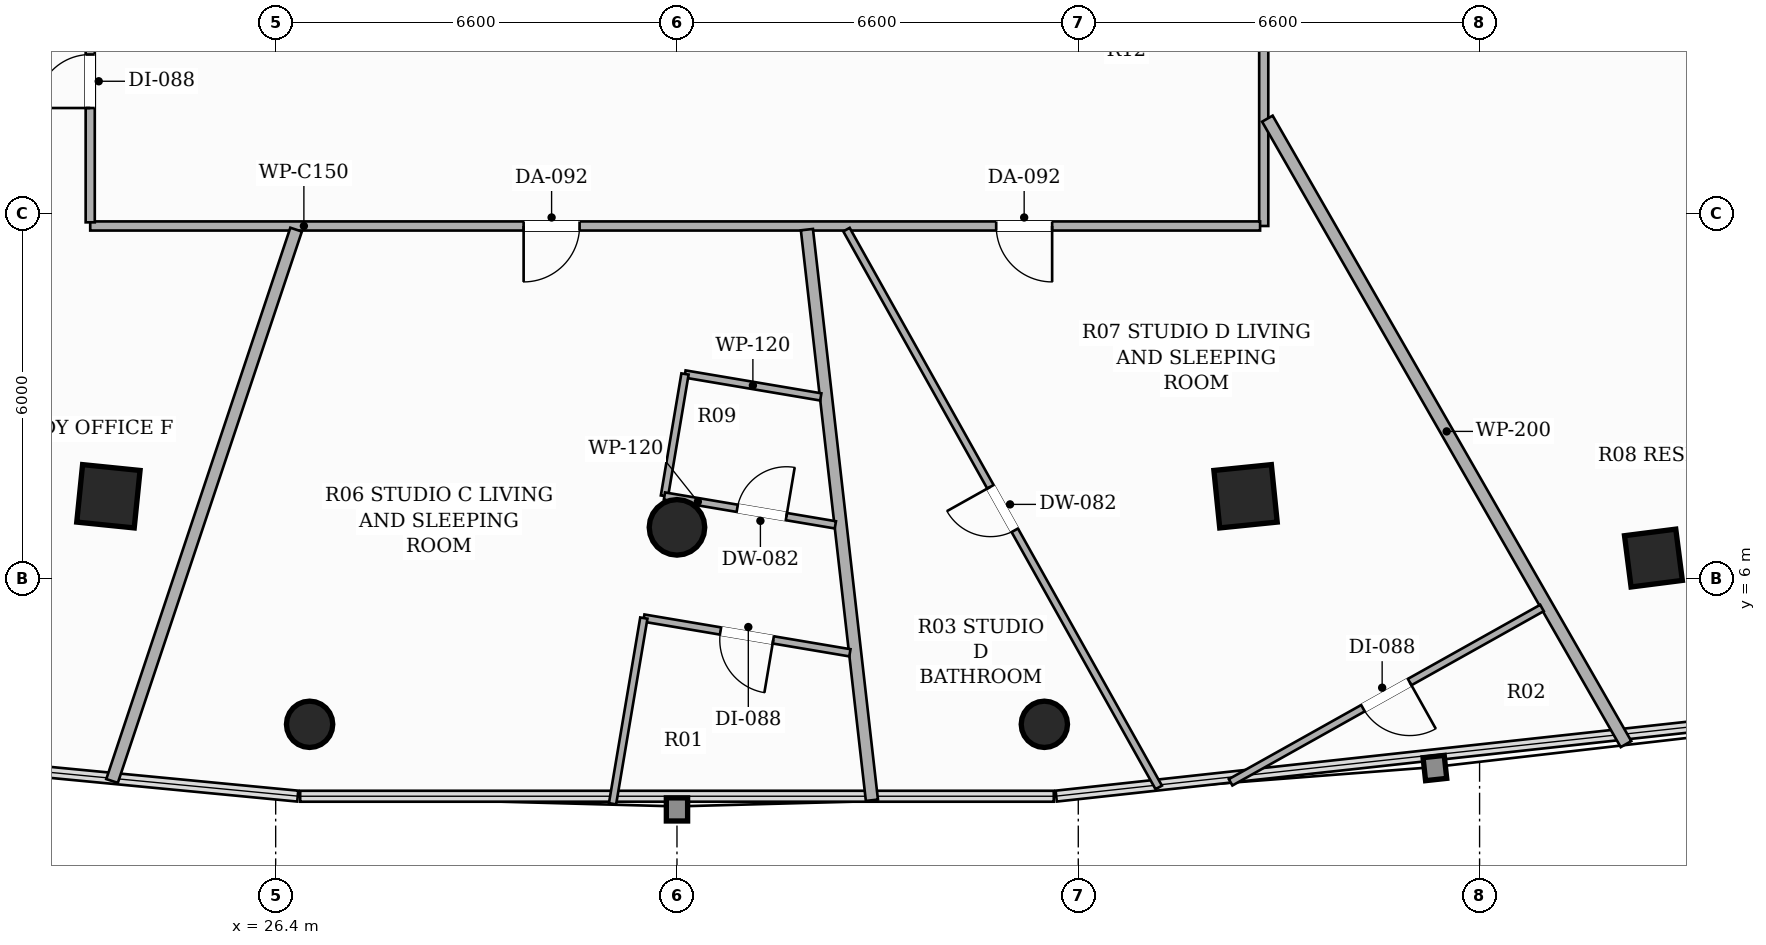
"""IFC4 building model, lengths in metres.
Left out: names, types, materials, properties, quantities, classifications, styles, units other than length and angle.
Written with IfcOpenShell. Run it as: python <this file> out.ifc"""

import sys

from ifc_helpers import new_model, si_unit, direction, frame, frame_2d, origin, origin_2d, place, context, subcontext, project, spatial, rectangle, hollow_rectangle, hollow_circle, extrude, element, fill, save


model = new_model("IFC4")
c1 = context("Model", 3, precision=1e-05, world=origin(), true_north=direction((0.0, 1.0)))
c2 = subcontext(c1, "Body", "Model", "MODEL_VIEW")
j1 = project(units=[si_unit("LENGTHUNIT", "METRE"), si_unit("PLANEANGLEUNIT", "RADIAN")], contexts=[c1])
p1 = place(None, origin())
s1 = spatial("IfcSite", under=j1, at=p1, CompositionType="ELEMENT")
p2 = place(p1, origin())
s2 = spatial("IfcBuilding", under=s1, at=p2, CompositionType="ELEMENT")
p3 = place(p2, frame((0.0, 0.0, 93.95)))
s3 = spatial("IfcBuildingStorey", under=s2, at=p3, CompositionType="ELEMENT", Elevation=93.95)
p4 = place(p3, frame((23.649, 7.355, 0.0), z_axis=(0.0, 0.0, 1.0), x_axis=(-0.994880708829, 0.101056297183, 0.0)))
e1 = element("IfcColumn", 1, at=p4, inside=s3, PredefinedType="COLUMN", context=c2, shape_type="SweptSolid", body=[
    extrude(hollow_rectangle(XDim=0.95, YDim=0.95, WallThickness=0.032, at=origin_2d()), origin(), (0.0, 0.0, 1.0), 3.3),
])
p5 = place(p3, frame((33.0, 6.844, 0.0), z_axis=(0.0, 0.0, 1.0), x_axis=(1.0, 0.0, 0.0)))
e2 = element("IfcColumn", 2, at=p5, inside=s3, PredefinedType="COLUMN", context=c2, shape_type="SweptSolid", body=[
    extrude(hollow_circle(Radius=0.457, WallThickness=0.025, at=origin_2d()), origin(), (0.0, 0.0, 1.0), 3.3),
])
p6 = place(p3, frame((42.351, 7.355, 0.0), z_axis=(0.0, 0.0, 1.0), x_axis=(0.994880708829, 0.101056297183, 0.0)))
e3 = element("IfcColumn", 3, at=p6, inside=s3, PredefinedType="COLUMN", context=c2, shape_type="SweptSolid", body=[
    extrude(hollow_rectangle(XDim=0.95, YDim=0.95, WallThickness=0.032, at=origin_2d()), origin(), (0.0, 0.0, 1.0), 3.3),
])
p7 = place(p3, frame((49.059, 6.339, 0.0), z_axis=(0.0, 0.0, 1.0), x_axis=(0.99189444259, 0.127064608601, 0.0)))
e4 = element("IfcColumn", 4, at=p7, inside=s3, PredefinedType="COLUMN", context=c2, shape_type="SweptSolid", body=[
    extrude(hollow_rectangle(XDim=0.85, YDim=0.85, WallThickness=0.028, at=origin_2d()), origin(), (0.0, 0.0, 1.0), 3.3),
])
for number, where, z_axis, x_axis in (
    (5, (26.958, 3.605, 0.0), (0.0, 0.0, 1.0), (1.0, 0.0, 0.0)),
    (6, (39.042, 3.605, 0.0), (0.0, 0.0, 1.0), (1.0, 0.0, 0.0)),
):
    element("IfcColumn", number, at=place(p3, frame(where, z_axis=z_axis, x_axis=x_axis)), inside=s3, PredefinedType="COLUMN", context=c2, shape_type="SweptSolid", body=[
        extrude(hollow_circle(Radius=0.381, WallThickness=0.022, at=origin_2d()), origin(), (0.0, 0.0, 1.0), 3.3),
    ])
p8 = place(p3, frame((42.65, 36.84, 0.0), z_axis=(0.0, 0.0, 1.0), x_axis=(0.0, -1.0, 0.0)))
e7 = element("IfcWall", 7, at=p8, inside=s3, PredefinedType="PARTITIONING", context=c2, shape_type="SweptSolid", body=[
    extrude(rectangle(XDim=25.04, YDim=0.15, at=frame_2d((12.52, 0.0))), origin(), (0.0, 0.0, 1.0), 2.373),
])
p9 = place(p8, frame((6.114, 0.0, 0.0)))
e8 = element("IfcOpeningElement", 8, at=p9, cuts=e7, PredefinedType="OPENING", context=c2, shape_type="SweptSolid", body=[
    extrude(rectangle(XDim=0.88, YDim=2.1, at=frame_2d((0.44, 1.05))), frame((0.0, 0.085, 0.0), z_axis=(0.0, -1.0, 0.0), x_axis=(1.0, 0.0, 0.0)), (0.0, 0.0, 1.0), 0.17),
])
p10 = place(p8, frame((18.864, 0.0, 0.0)))
e9 = element("IfcOpeningElement", 9, at=p10, cuts=e7, PredefinedType="OPENING", context=c2, shape_type="SweptSolid", body=[
    extrude(rectangle(XDim=0.88, YDim=2.1, at=frame_2d((0.44, 1.05))), frame((0.0, 0.085, 0.0), z_axis=(0.0, -1.0, 0.0), x_axis=(1.0, 0.0, 0.0)), (0.0, 0.0, 1.0), 0.17),
])
p11 = place(p8, frame((13.765, 0.0, 0.0)))
e10 = element("IfcOpeningElement", 10, at=p11, cuts=e7, PredefinedType="OPENING", context=c2, shape_type="SweptSolid", body=[
    extrude(rectangle(XDim=0.92, YDim=2.15, at=frame_2d((0.46, 1.075))), frame((0.0, 0.085, 0.0), z_axis=(0.0, -1.0, 0.0), x_axis=(1.0, 0.0, 0.0)), (0.0, 0.0, 1.0), 0.17),
])
p12 = place(p3, frame((42.59, 11.8, 0.0), z_axis=(0.0, 0.0, 1.0), x_axis=(-1.0, 0.0, 0.0)))
e11 = element("IfcWall", 11, at=p12, inside=s3, PredefinedType="PARTITIONING", context=c2, shape_type="SweptSolid", body=[
    extrude(rectangle(XDim=19.24, YDim=0.15, at=frame_2d((9.62, 0.0))), origin(), (0.0, 0.0, 1.0), 2.629),
])
p13 = place(p12, frame((11.192, 0.0, 0.0)))
e12 = element("IfcOpeningElement", 12, at=p13, cuts=e11, PredefinedType="OPENING", context=c2, shape_type="SweptSolid", body=[
    extrude(rectangle(XDim=0.92, YDim=2.15, at=frame_2d((0.46, 1.075))), frame((0.0, 0.085, 0.0), z_axis=(0.0, -1.0, 0.0), x_axis=(1.0, 0.0, 0.0)), (0.0, 0.0, 1.0), 0.17),
])
p14 = place(p12, frame((3.42, 0.0, 0.0)))
e13 = element("IfcOpeningElement", 13, at=p14, cuts=e11, PredefinedType="OPENING", context=c2, shape_type="SweptSolid", body=[
    extrude(rectangle(XDim=0.92, YDim=2.15, at=frame_2d((0.46, 1.075))), frame((0.0, 0.085, 0.0), z_axis=(0.0, -1.0, 0.0), x_axis=(1.0, 0.0, 0.0)), (0.0, 0.0, 1.0), 0.17),
])
p15 = place(p3, frame((23.35, 11.86, 0.0), z_axis=(0.0, 0.0, 1.0), x_axis=(0.0, 1.0, 0.0)))
e14 = element("IfcWall", 14, at=p15, inside=s3, PredefinedType="PARTITIONING", context=c2, shape_type="SweptSolid", body=[
    extrude(rectangle(XDim=25.04, YDim=0.15, at=frame_2d((12.52, 0.0))), origin(), (0.0, 0.0, 1.0), 2.373),
])
p16 = place(p15, frame((18.285, 0.0, 0.0)))
e15 = element("IfcOpeningElement", 15, at=p16, cuts=e14, PredefinedType="OPENING", context=c2, shape_type="SweptSolid", body=[
    extrude(rectangle(XDim=0.88, YDim=2.1, at=frame_2d((0.44, 1.05))), frame((0.0, 0.085, 0.0), z_axis=(0.0, -1.0, 0.0), x_axis=(1.0, 0.0, 0.0)), (0.0, 0.0, 1.0), 0.17),
])
p17 = place(p15, frame((10.545, 0.0, 0.0)))
e16 = element("IfcOpeningElement", 16, at=p17, cuts=e14, PredefinedType="OPENING", context=c2, shape_type="SweptSolid", body=[
    extrude(rectangle(XDim=0.88, YDim=2.1, at=frame_2d((0.44, 1.05))), frame((0.0, 0.085, 0.0), z_axis=(0.0, -1.0, 0.0), x_axis=(1.0, 0.0, 0.0)), (0.0, 0.0, 1.0), 0.17),
])
p18 = place(p15, frame((6.496, 0.0, 0.0)))
e17 = element("IfcOpeningElement", 17, at=p18, cuts=e14, PredefinedType="OPENING", context=c2, shape_type="SweptSolid", body=[
    extrude(rectangle(XDim=0.88, YDim=2.1, at=frame_2d((0.44, 1.05))), frame((0.0, 0.085, 0.0), z_axis=(0.0, -1.0, 0.0), x_axis=(1.0, 0.0, 0.0)), (0.0, 0.0, 1.0), 0.17),
])
p19 = place(p15, frame((1.88, 0.0, 0.0)))
e18 = element("IfcOpeningElement", 18, at=p19, cuts=e14, PredefinedType="OPENING", context=c2, shape_type="SweptSolid", body=[
    extrude(rectangle(XDim=0.88, YDim=2.1, at=frame_2d((0.44, 1.05))), frame((0.0, 0.085, 0.0), z_axis=(0.0, -1.0, 0.0), x_axis=(1.0, 0.0, 0.0)), (0.0, 0.0, 1.0), 0.17),
])
p20 = place(p3, frame((57.393, 14.263, 0.0), z_axis=(0.0, 0.0, 1.0), x_axis=(-0.83243126042, 0.554128321488, 0.0)))
e19 = element("IfcWall", 19, at=p20, inside=s3, PredefinedType="PARTITIONING", context=c2, shape_type="SweptSolid", body=[
    extrude(rectangle(XDim=17.639, YDim=0.2, at=frame_2d((8.819, 0.0))), origin(), (0.0, 0.0, 1.0), 2.373),
])
p21 = place(p3, frame((48.608, 3.279, 0.0), z_axis=(0.0, 0.0, 1.0), x_axis=(-0.497428948928, 0.867504720891, 0.0)))
e20 = element("IfcWall", 20, at=p21, inside=s3, PredefinedType="PARTITIONING", context=c2, shape_type="SweptSolid", body=[
    extrude(rectangle(XDim=11.857, YDim=0.2, at=frame_2d((5.928, 0.0))), origin(), (0.0, 0.0, 1.0), 2.373),
])
p22 = place(p3, frame((42.71, 21.57, 0.0), z_axis=(0.0, 0.0, 1.0), x_axis=(0.736048495707, -0.67692880864, 0.0)))
e21 = element("IfcWall", 21, at=p22, inside=s3, PredefinedType="PARTITIONING", context=c2, shape_type="SweptSolid", body=[
    extrude(rectangle(XDim=23.274, YDim=0.2, at=frame_2d((11.637, 0.0))), origin(), (0.0, 0.0, 1.0), 2.373),
])
p23 = place(p3, frame((23.29, 21.11, 0.0), z_axis=(0.0, 0.0, 1.0), x_axis=(-0.718846392138, -0.695168946739, 0.0)))
e22 = element("IfcWall", 22, at=p23, inside=s3, PredefinedType="PARTITIONING", context=c2, shape_type="SweptSolid", body=[
    extrude(rectangle(XDim=22.973, YDim=0.2, at=frame_2d((11.487, 0.0))), origin(), (0.0, 0.0, 1.0), 2.373),
])
p24 = place(p3, frame((35.137, 11.74, 0.0), z_axis=(0.0, 0.0, 1.0), x_axis=(0.113194461651, -0.993572852815, 0.0)))
e23 = element("IfcWall", 23, at=p24, inside=s3, PredefinedType="PARTITIONING", context=c2, shape_type="SweptSolid", body=[
    extrude(rectangle(XDim=9.445, YDim=0.2, at=frame_2d((4.722, 0.0))), origin(), (0.0, 0.0, 1.0), 2.373),
])
p25 = place(p3, frame((23.709, 2.673, 0.0), z_axis=(0.0, 0.0, 1.0), x_axis=(0.316679801448, 0.948532499894, 0.0)))
e24 = element("IfcWall", 24, at=p25, inside=s3, PredefinedType="PARTITIONING", context=c2, shape_type="SweptSolid", body=[
    extrude(rectangle(XDim=9.559, YDim=0.2, at=frame_2d((4.779, 0.0))), origin(), (0.0, 0.0, 1.0), 2.373),
])
p26 = place(p3, frame((23.29, 16.503, 0.0), z_axis=(0.0, 0.0, 1.0), x_axis=(-0.57002789499, -0.821625339759, 0.0)))
e25 = element("IfcWall", 25, at=p26, inside=s3, PredefinedType="PARTITIONING", context=c2, shape_type="SweptSolid", body=[
    extrude(rectangle(XDim=15.671, YDim=0.2, at=frame_2d((7.836, 0.0))), origin(), (0.0, 0.0, 1.0), 2.373),
])
p27 = place(p3, frame((35.365, 8.989, 0.0), z_axis=(0.0, 0.0, 1.0), x_axis=(-0.986047933852, 0.166461623646, 0.0)))
e26 = element("IfcWall", 26, at=p27, inside=s3, PredefinedType="PARTITIONING", context=c2, shape_type="SweptSolid", body=[
    extrude(rectangle(XDim=2.264, YDim=0.12, at=frame_2d((1.132, 0.0))), origin(), (0.0, 0.0, 1.0), 2.629),
])
p28 = place(p3, frame((33.132, 9.366, 0.0), z_axis=(0.0, 0.0, 1.0), x_axis=(-0.166129895483, -0.986103877807, 0.0)))
e27 = element("IfcWall", 27, at=p28, inside=s3, PredefinedType="PARTITIONING", context=c2, shape_type="SweptSolid", body=[
    extrude(rectangle(XDim=2.035, YDim=0.12, at=frame_2d((1.018, 0.0))), origin(), (0.0, 0.0, 1.0), 2.629),
])
p29 = place(p3, frame((32.794, 7.359, 0.0), z_axis=(0.0, 0.0, 1.0), x_axis=(0.986086685245, -0.166231913849, 0.0)))
e28 = element("IfcWall", 28, at=p29, inside=s3, PredefinedType="PARTITIONING", context=c2, shape_type="SweptSolid", body=[
    extrude(rectangle(XDim=2.851, YDim=0.12, at=frame_2d((1.425, 0.0))), origin(), (0.0, 0.0, 1.0), 2.629),
])
p30 = place(p29, frame((1.214, 0.0, 0.0)))
e29 = element("IfcOpeningElement", 29, at=p30, cuts=e28, PredefinedType="OPENING", context=c2, shape_type="SweptSolid", body=[
    extrude(rectangle(XDim=0.82, YDim=2.1, at=frame_2d((0.41, 1.05))), frame((0.0, 0.07, 0.0), z_axis=(0.0, -1.0, 0.0), x_axis=(1.0, 0.0, 0.0)), (0.0, 0.0, 1.0), 0.14),
])
p31 = place(p3, frame((35.844, 4.781, 0.0), z_axis=(0.0, 0.0, 1.0), x_axis=(-0.986098591399, 0.166161271182, 0.0)))
e30 = element("IfcWall", 30, at=p31, inside=s3, PredefinedType="PARTITIONING", context=c2, shape_type="SweptSolid", body=[
    extrude(rectangle(XDim=3.437, YDim=0.12, at=frame_2d((1.718, 0.0))), origin(), (0.0, 0.0, 1.0), 3.02),
])
p32 = place(p31, frame((1.278, 0.0, 0.0)))
e31 = element("IfcOpeningElement", 31, at=p32, cuts=e30, PredefinedType="OPENING", context=c2, shape_type="SweptSolid", body=[
    extrude(rectangle(XDim=0.88, YDim=2.1, at=frame_2d((0.44, 1.05))), frame((0.0, 0.07, 0.0), z_axis=(0.0, -1.0, 0.0), x_axis=(1.0, 0.0, 0.0)), (0.0, 0.0, 1.0), 0.14),
])
p33 = place(p3, frame((32.455, 5.352, 0.0), z_axis=(0.0, 0.0, 1.0), x_axis=(-0.166328914583, -0.986070328209, 0.0)))
e32 = element("IfcWall", 32, at=p33, inside=s3, PredefinedType="PARTITIONING", context=c2, shape_type="SweptSolid", body=[
    extrude(rectangle(XDim=3.097, YDim=0.12, at=frame_2d((1.549, 0.0))), origin(), (0.0, 0.0, 1.0), 3.02),
])
p34 = place(p3, frame((40.923, 2.567, 0.0), z_axis=(0.0, 0.0, 1.0), x_axis=(-0.4884640488, 0.872584020613, 0.0)))
e33 = element("IfcWall", 33, at=p34, inside=s3, PredefinedType="PARTITIONING", context=c2, shape_type="SweptSolid", body=[
    extrude(rectangle(XDim=10.512, YDim=0.12, at=frame_2d((5.256, 0.0))), origin(), (0.0, 0.0, 1.0), 2.373),
])
p35 = place(p34, frame((4.846, 0.0, 0.0)))
e34 = element("IfcOpeningElement", 34, at=p35, cuts=e33, PredefinedType="OPENING", context=c2, shape_type="SweptSolid", body=[
    extrude(rectangle(XDim=0.82, YDim=2.1, at=frame_2d((0.41, 1.05))), frame((0.0, 0.07, 0.0), z_axis=(0.0, -1.0, 0.0), x_axis=(1.0, 0.0, 0.0)), (0.0, 0.0, 1.0), 0.14),
])
p36 = place(p3, frame((47.226, 5.518, 0.0), z_axis=(0.0, 0.0, 1.0), x_axis=(-0.872551409816, -0.488522299622, 0.0)))
e35 = element("IfcWall", 35, at=p36, inside=s3, PredefinedType="PARTITIONING", context=c2, shape_type="SweptSolid", body=[
    extrude(rectangle(XDim=5.869, YDim=0.12, at=frame_2d((2.935, 0.0))), origin(), (0.0, 0.0, 1.0), 3.02),
])
p37 = place(p36, frame((2.494, 0.0, 0.0)))
e36 = element("IfcOpeningElement", 36, at=p37, cuts=e35, PredefinedType="OPENING", context=c2, shape_type="SweptSolid", body=[
    extrude(rectangle(XDim=0.88, YDim=2.1, at=frame_2d((0.44, 1.05))), frame((0.0, 0.07, 0.0), z_axis=(0.0, -1.0, 0.0), x_axis=(1.0, 0.0, 0.0)), (0.0, 0.0, 1.0), 0.14),
])
p38 = place(p3, frame((48.927, 18.835, 0.0), z_axis=(0.0, 0.0, 1.0), x_axis=(0.744157434795, -0.668004275615, 0.0)))
e37 = element("IfcWall", 37, at=p38, inside=s3, PredefinedType="PARTITIONING", context=c2, shape_type="SweptSolid", body=[
    extrude(rectangle(XDim=7.996, YDim=0.12, at=frame_2d((3.998, 0.0))), origin(), (0.0, 0.0, 1.0), 2.373),
])
p39 = place(p38, frame((3.588, 0.0, 0.0)))
e38 = element("IfcOpeningElement", 38, at=p39, cuts=e37, PredefinedType="OPENING", context=c2, shape_type="SweptSolid", body=[
    extrude(rectangle(XDim=0.82, YDim=2.1, at=frame_2d((0.41, 1.05))), frame((0.0, 0.07, 0.0), z_axis=(0.0, -1.0, 0.0), x_axis=(1.0, 0.0, 0.0)), (0.0, 0.0, 1.0), 0.14),
])
p40 = place(p13, origin())
e39 = element("IfcDoor", 39, at=p40, inside=s3, OperationType="SINGLE_SWING_RIGHT", PredefinedType="DOOR", context=c2, shape_type="SweptSolid", body=[
    extrude(rectangle(XDim=0.92, YDim=2.15, at=frame_2d((0.46, 1.075))), frame((0.0, 0.025, 0.0), z_axis=(0.0, -1.0, 0.0), x_axis=(1.0, 0.0, 0.0)), (0.0, 0.0, 1.0), 0.05),
])
fill(e12, e39)
p41 = place(p30, origin())
e40 = element("IfcDoor", 40, at=p41, inside=s3, OperationType="SINGLE_SWING_RIGHT", PredefinedType="DOOR", context=c2, shape_type="SweptSolid", body=[
    extrude(rectangle(XDim=0.82, YDim=2.1, at=frame_2d((0.41, 1.05))), frame((0.0, 0.025, 0.0), z_axis=(0.0, -1.0, 0.0), x_axis=(1.0, 0.0, 0.0)), (0.0, 0.0, 1.0), 0.05),
])
fill(e29, e40)
p42 = place(p32, origin())
e41 = element("IfcDoor", 41, at=p42, inside=s3, OperationType="SINGLE_SWING_LEFT", PredefinedType="DOOR", context=c2, shape_type="SweptSolid", body=[
    extrude(rectangle(XDim=0.88, YDim=2.1, at=frame_2d((0.44, 1.05))), frame((0.0, 0.025, 0.0), z_axis=(0.0, -1.0, 0.0), x_axis=(1.0, 0.0, 0.0)), (0.0, 0.0, 1.0), 0.05),
])
fill(e31, e41)
p43 = place(p14, origin())
e42 = element("IfcDoor", 42, at=p43, inside=s3, OperationType="SINGLE_SWING_LEFT", PredefinedType="DOOR", context=c2, shape_type="SweptSolid", body=[
    extrude(rectangle(XDim=0.92, YDim=2.15, at=frame_2d((0.46, 1.075))), frame((0.0, 0.025, 0.0), z_axis=(0.0, -1.0, 0.0), x_axis=(1.0, 0.0, 0.0)), (0.0, 0.0, 1.0), 0.05),
])
fill(e13, e42)
p44 = place(p35, origin())
e43 = element("IfcDoor", 43, at=p44, inside=s3, OperationType="SINGLE_SWING_RIGHT", PredefinedType="DOOR", context=c2, shape_type="SweptSolid", body=[
    extrude(rectangle(XDim=0.82, YDim=2.1, at=frame_2d((0.41, 1.05))), frame((0.0, 0.025, 0.0), z_axis=(0.0, -1.0, 0.0), x_axis=(1.0, 0.0, 0.0)), (0.0, 0.0, 1.0), 0.05),
])
fill(e34, e43)
p45 = place(p37, origin())
e44 = element("IfcDoor", 44, at=p45, inside=s3, OperationType="SINGLE_SWING_LEFT", PredefinedType="DOOR", context=c2, shape_type="SweptSolid", body=[
    extrude(rectangle(XDim=0.88, YDim=2.1, at=frame_2d((0.44, 1.05))), frame((0.0, 0.025, 0.0), z_axis=(0.0, -1.0, 0.0), x_axis=(1.0, 0.0, 0.0)), (0.0, 0.0, 1.0), 0.05),
])
fill(e36, e44)
p46 = place(p19, origin())
e45 = element("IfcDoor", 45, at=p46, inside=s3, OperationType="SINGLE_SWING_LEFT", PredefinedType="DOOR", context=c2, shape_type="SweptSolid", body=[
    extrude(rectangle(XDim=0.88, YDim=2.1, at=frame_2d((0.44, 1.05))), frame((0.0, 0.025, 0.0), z_axis=(0.0, -1.0, 0.0), x_axis=(1.0, 0.0, 0.0)), (0.0, 0.0, 1.0), 0.05),
])
fill(e18, e45)
save(model, sys.argv[1])
